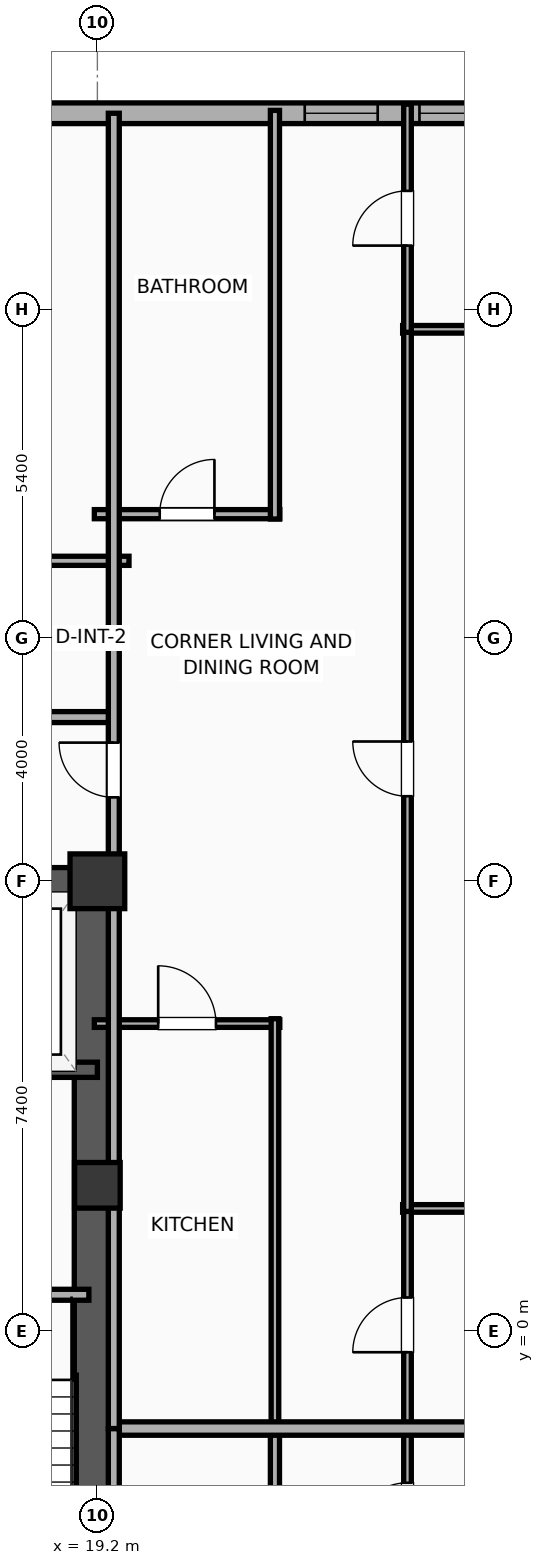
"""IFC4 building model, lengths in metres.
Left out: names, types, materials, properties, quantities, classifications, styles, units other than length and angle.
Written with IfcOpenShell. Run it as: python <this file> out.ifc"""

import sys

from ifc_helpers import new_model, si_unit, direction, frame, frame_2d, origin, origin_2d, place, context, subcontext, project, spatial, rectangle, extrude, element, fill, save


model = new_model("IFC4")
c1 = context("Model", 3, precision=1e-05, world=origin(), true_north=direction((0.0, 1.0)))
c2 = subcontext(c1, "Body", "Model", "MODEL_VIEW")
j1 = project(units=[si_unit("LENGTHUNIT", "METRE"), si_unit("PLANEANGLEUNIT", "RADIAN")], contexts=[c1])
p1 = place(None, origin())
s1 = spatial("IfcSite", under=j1, at=p1, CompositionType="ELEMENT")
p2 = place(p1, origin())
s2 = spatial("IfcBuilding", under=s1, at=p2, CompositionType="ELEMENT")
p3 = place(p2, frame((0.0, 0.0, 200.2)))
s3 = spatial("IfcBuildingStorey", under=s2, at=p3, CompositionType="ELEMENT", Elevation=200.2)
p4 = place(p3, frame((19.2, 2.4, 0.0), z_axis=(0.0, 0.0, 1.0), x_axis=(1.0, 0.0, 0.0)))
e1 = element("IfcColumn", 1, at=p4, inside=s3, PredefinedType="COLUMN", context=c2, shape_type="SweptSolid", body=[
    extrude(rectangle(XDim=0.75, YDim=0.75, at=origin_2d()), origin(), (0.0, 0.0, 1.0), 3.9),
])
p5 = place(p3, frame((19.2, 7.4, 0.0), z_axis=(0.0, 0.0, 1.0), x_axis=(1.0, 0.0, 0.0)))
e2 = element("IfcColumn", 2, at=p5, inside=s3, PredefinedType="COLUMN", context=c2, shape_type="SweptSolid", body=[
    extrude(rectangle(XDim=0.9, YDim=0.9, at=origin_2d()), origin(), (0.0, 0.0, 1.0), 3.9),
])
p6 = place(p3, frame((12.175, 7.4, 0.0), z_axis=(0.0, 0.0, 1.0), x_axis=(1.0, 0.0, 0.0)))
e3 = element("IfcWall", 3, at=p6, inside=s3, PredefinedType="SHEAR", context=c2, shape_type="SweptSolid", body=[
    extrude(rectangle(XDim=7.25, YDim=0.45, at=frame_2d((3.625, 0.0))), origin(), (0.0, 0.0, 1.0), 3.65),
])
p7 = place(p3, frame((19.145, -7.4, 0.0), z_axis=(0.0, 0.0, 1.0), x_axis=(0.0, 1.0, 0.0)))
e4 = element("IfcWall", 4, at=p7, inside=s3, PredefinedType="SHEAR", context=c2, shape_type="SweptSolid", body=[
    extrude(rectangle(XDim=14.8, YDim=0.65, at=frame_2d((7.4, 0.0))), origin(), (0.0, 0.0, 1.0), 3.65),
])
p8 = place(p3, frame((-22.783, 20.03, 0.0), z_axis=(0.0, 0.0, 1.0), x_axis=(1.0, 0.0, 0.0)))
e5 = element("IfcWall", 5, at=p8, inside=s3, PredefinedType="ELEMENTEDWALL", context=c2, shape_type="SweptSolid", body=[
    extrude(rectangle(XDim=49.566, YDim=0.34, at=frame_2d((24.783, 0.0))), origin(), (0.0, 0.0, 1.0), 2.54),
])
p9 = place(p8, frame((6.211, 0.0, 0.75)))
e6 = element("IfcOpeningElement", 6, at=p9, cuts=e5, PredefinedType="OPENING", context=c2, shape_type="SweptSolid", body=[
    extrude(rectangle(XDim=2.4, YDim=1.63, at=frame_2d((1.2, 0.815))), frame((0.0, 0.18, 0.0), z_axis=(0.0, -1.0, 0.0), x_axis=(1.0, 0.0, 0.0)), (0.0, 0.0, 1.0), 0.36),
])
p10 = place(p8, frame((23.583, 0.0, 0.75)))
e7 = element("IfcOpeningElement", 7, at=p10, cuts=e5, PredefinedType="OPENING", context=c2, shape_type="SweptSolid", body=[
    extrude(rectangle(XDim=2.4, YDim=1.63, at=frame_2d((1.2, 0.815))), frame((0.0, 0.18, 0.0), z_axis=(0.0, -1.0, 0.0), x_axis=(1.0, 0.0, 0.0)), (0.0, 0.0, 1.0), 0.36),
])
p11 = place(p8, frame((3.893, 0.0, 0.75)))
e8 = element("IfcOpeningElement", 8, at=p11, cuts=e5, PredefinedType="OPENING", context=c2, shape_type="SweptSolid", body=[
    extrude(rectangle(XDim=1.2, YDim=1.63, at=frame_2d((0.6, 0.815))), frame((0.0, 0.18, 0.0), z_axis=(0.0, -1.0, 0.0), x_axis=(1.0, 0.0, 0.0)), (0.0, 0.0, 1.0), 0.36),
])
p12 = place(p8, frame((11.273, 0.0, 0.75)))
e9 = element("IfcOpeningElement", 9, at=p12, cuts=e5, PredefinedType="OPENING", context=c2, shape_type="SweptSolid", body=[
    extrude(rectangle(XDim=1.2, YDim=1.63, at=frame_2d((0.6, 0.815))), frame((0.0, 0.18, 0.0), z_axis=(0.0, -1.0, 0.0), x_axis=(1.0, 0.0, 0.0)), (0.0, 0.0, 1.0), 0.36),
])
p13 = place(p8, frame((31.889, 0.0, 0.75)))
e10 = element("IfcOpeningElement", 10, at=p13, cuts=e5, PredefinedType="OPENING", context=c2, shape_type="SweptSolid", body=[
    extrude(rectangle(XDim=1.2, YDim=1.63, at=frame_2d((0.6, 0.815))), frame((0.0, 0.18, 0.0), z_axis=(0.0, -1.0, 0.0), x_axis=(1.0, 0.0, 0.0)), (0.0, 0.0, 1.0), 0.36),
])
p14 = place(p8, frame((34.719, 0.0, 0.75)))
e11 = element("IfcOpeningElement", 11, at=p14, cuts=e5, PredefinedType="OPENING", context=c2, shape_type="SweptSolid", body=[
    extrude(rectangle(XDim=1.2, YDim=1.63, at=frame_2d((0.6, 0.815))), frame((0.0, 0.18, 0.0), z_axis=(0.0, -1.0, 0.0), x_axis=(1.0, 0.0, 0.0)), (0.0, 0.0, 1.0), 0.36),
])
p15 = place(p8, frame((37.823, 0.0, 0.75)))
e12 = element("IfcOpeningElement", 12, at=p15, cuts=e5, PredefinedType="OPENING", context=c2, shape_type="SweptSolid", body=[
    extrude(rectangle(XDim=1.2, YDim=1.63, at=frame_2d((0.6, 0.815))), frame((0.0, 0.18, 0.0), z_axis=(0.0, -1.0, 0.0), x_axis=(1.0, 0.0, 0.0)), (0.0, 0.0, 1.0), 0.36),
])
p16 = place(p8, frame((16.113, 0.0, 0.75)))
e13 = element("IfcOpeningElement", 13, at=p16, cuts=e5, PredefinedType="OPENING", context=c2, shape_type="SweptSolid", body=[
    extrude(rectangle(XDim=1.2, YDim=1.63, at=frame_2d((0.6, 0.815))), frame((0.0, 0.18, 0.0), z_axis=(0.0, -1.0, 0.0), x_axis=(1.0, 0.0, 0.0)), (0.0, 0.0, 1.0), 0.36),
])
p17 = place(p8, frame((20.513, 0.0, 0.75)))
e14 = element("IfcOpeningElement", 14, at=p17, cuts=e5, PredefinedType="OPENING", context=c2, shape_type="SweptSolid", body=[
    extrude(rectangle(XDim=1.2, YDim=1.63, at=frame_2d((0.6, 0.815))), frame((0.0, 0.18, 0.0), z_axis=(0.0, -1.0, 0.0), x_axis=(1.0, 0.0, 0.0)), (0.0, 0.0, 1.0), 0.36),
])
p18 = place(p8, frame((27.893, 0.0, 0.75)))
e15 = element("IfcOpeningElement", 15, at=p18, cuts=e5, PredefinedType="OPENING", context=c2, shape_type="SweptSolid", body=[
    extrude(rectangle(XDim=1.2, YDim=1.63, at=frame_2d((0.6, 0.815))), frame((0.0, 0.18, 0.0), z_axis=(0.0, -1.0, 0.0), x_axis=(1.0, 0.0, 0.0)), (0.0, 0.0, 1.0), 0.36),
])
p19 = place(p8, frame((45.393, 0.0, 0.75)))
e16 = element("IfcOpeningElement", 16, at=p19, cuts=e5, PredefinedType="OPENING", context=c2, shape_type="SweptSolid", body=[
    extrude(rectangle(XDim=1.2, YDim=1.63, at=frame_2d((0.6, 0.815))), frame((0.0, 0.18, 0.0), z_axis=(0.0, -1.0, 0.0), x_axis=(1.0, 0.0, 0.0)), (0.0, 0.0, 1.0), 0.36),
])
p20 = place(p8, frame((47.28, 0.0, 0.75)))
e17 = element("IfcOpeningElement", 17, at=p20, cuts=e5, PredefinedType="OPENING", context=c2, shape_type="SweptSolid", body=[
    extrude(rectangle(XDim=1.2, YDim=1.63, at=frame_2d((0.6, 0.815))), frame((0.0, 0.18, 0.0), z_axis=(0.0, -1.0, 0.0), x_axis=(1.0, 0.0, 0.0)), (0.0, 0.0, 1.0), 0.36),
])
p21 = place(p3, frame((16.6, 4.3, 0.0), z_axis=(0.0, 0.0, 1.0), x_axis=(1.0, 0.0, 0.0)))
e18 = element("IfcWall", 18, at=p21, inside=s3, PredefinedType="SOLIDWALL", context=c2, shape_type="SweptSolid", body=[
    extrude(rectangle(XDim=2.6, YDim=0.25, at=frame_2d((1.3, 0.0))), origin(), (0.0, 0.0, 1.0), 3.65),
])
p22 = place(p3, frame((15.7, 0.6, 0.0), z_axis=(0.0, 0.0, 1.0), x_axis=(1.0, 0.0, 0.0)))
e19 = element("IfcWall", 19, at=p22, inside=s3, PredefinedType="PARTITIONING", context=c2, shape_type="SweptSolid", body=[
    extrude(rectangle(XDim=3.36, YDim=0.18, at=frame_2d((1.68, 0.0))), origin(), (0.0, 0.0, 1.0), 3.65),
])
p23 = place(p22, frame((1.155, 0.0, 0.0)))
e20 = element("IfcOpeningElement", 20, at=p23, cuts=e19, PredefinedType="OPENING", context=c2, shape_type="SweptSolid", body=[
    extrude(rectangle(XDim=1.05, YDim=2.05, at=frame_2d((0.525, 1.025))), frame((0.0, 0.1, 0.0), z_axis=(0.0, -1.0, 0.0), x_axis=(1.0, 0.0, 0.0)), (0.0, 0.0, 1.0), 0.2),
])
p24 = place(p3, frame((17.436, 12.67, 0.0), z_axis=(0.0, 0.0, 1.0), x_axis=(1.0, 0.0, 0.0)))
e21 = element("IfcWall", 21, at=p24, inside=s3, PredefinedType="PLUMBINGWALL", context=c2, shape_type="SweptSolid", body=[
    extrude(rectangle(XDim=2.284, YDim=0.15, at=frame_2d((1.142, 0.0))), origin(), (0.0, 0.0, 1.0), 3.65),
])
p25 = place(p3, frame((8.08, 10.1, 0.0), z_axis=(0.0, 0.0, 1.0), x_axis=(1.0, 0.0, 0.0)))
e22 = element("IfcWall", 22, at=p25, inside=s3, PredefinedType="PARTITIONING", context=c2, shape_type="SweptSolid", body=[
    extrude(rectangle(XDim=11.42, YDim=0.18, at=frame_2d((5.71, 0.0))), origin(), (0.0, 0.0, 1.0), 3.65),
])
p26 = place(p25, frame((1.081, 0.0, 0.0)))
e23 = element("IfcOpeningElement", 23, at=p26, cuts=e22, PredefinedType="OPENING", context=c2, shape_type="SweptSolid", body=[
    extrude(rectangle(XDim=1.15, YDim=2.05, at=frame_2d((0.575, 1.025))), frame((0.0, 0.1, 0.0), z_axis=(0.0, -1.0, 0.0), x_axis=(1.0, 0.0, 0.0)), (0.0, 0.0, 1.0), 0.2),
])
p27 = place(p25, frame((8.243, 0.0, 0.0)))
e24 = element("IfcOpeningElement", 24, at=p27, cuts=e22, PredefinedType="OPENING", context=c2, shape_type="SweptSolid", body=[
    extrude(rectangle(XDim=0.9, YDim=2.05, at=frame_2d((0.45, 1.025))), frame((0.0, 0.1, 0.0), z_axis=(0.0, -1.0, 0.0), x_axis=(1.0, 0.0, 0.0)), (0.0, 0.0, 1.0), 0.2),
])
p28 = place(p3, frame((24.3, -4.544, 0.0), z_axis=(0.0, 0.0, 1.0), x_axis=(0.0, 1.0, 0.0)))
e25 = element("IfcWall", 25, at=p28, inside=s3, PredefinedType="PARTITIONING", context=c2, shape_type="SweptSolid", body=[
    extrude(rectangle(XDim=3.006, YDim=0.125, at=frame_2d((1.503, 0.0))), origin(), (0.0, 0.0, 1.0), 3.65),
])
p29 = place(p28, frame((1.152, 0.0, 0.0)))
e26 = element("IfcOpeningElement", 26, at=p29, cuts=e25, PredefinedType="OPENING", context=c2, shape_type="SweptSolid", body=[
    extrude(rectangle(XDim=0.9, YDim=2.05, at=frame_2d((0.45, 1.025))), frame((0.0, 0.073, 0.0), z_axis=(0.0, -1.0, 0.0), x_axis=(1.0, 0.0, 0.0)), (0.0, 0.0, 1.0), 0.145),
])
p30 = place(p3, frame((22.12, -8.267, 0.0), z_axis=(0.0, 0.0, 1.0), x_axis=(0.0, 1.0, 0.0)))
e27 = element("IfcWall", 27, at=p30, inside=s3, PredefinedType="PLUMBINGWALL", context=c2, shape_type="SweptSolid", body=[
    extrude(rectangle(XDim=6.647, YDim=0.15, at=frame_2d((3.323, 0.0))), origin(), (0.0, 0.0, 1.0), 3.65),
])
for number, where, z_axis, x_axis in (
    (28, (24.22, 2.02, 0.0), (0.0, 0.0, 1.0), (1.0, 0.0, 0.0)),
    (29, (24.22, 16.477, 0.0), (0.0, 0.0, 1.0), (1.0, 0.0, 0.0)),
):
    element("IfcWall", number, at=place(p3, frame(where, z_axis=z_axis, x_axis=x_axis)), inside=s3, PredefinedType="PARTITIONING", context=c2, shape_type="SweptSolid", body=[
        extrude(rectangle(XDim=6.16, YDim=0.125, at=frame_2d((3.08, 0.0))), origin(), (0.0, 0.0, 1.0), 3.65),
    ])
p31 = place(p3, frame((24.3, -1.663, 0.0), z_axis=(0.0, 0.0, 1.0), x_axis=(0.0, 1.0, 0.0)))
e30 = element("IfcWall", 30, at=p31, inside=s3, PredefinedType="PARTITIONING", context=c2, shape_type="SweptSolid", body=[
    extrude(rectangle(XDim=3.733, YDim=0.125, at=frame_2d((1.866, 0.0))), origin(), (0.0, 0.0, 1.0), 3.65),
])
p32 = place(p31, frame((1.317, 0.0, 0.0)))
e31 = element("IfcOpeningElement", 31, at=p32, cuts=e30, PredefinedType="OPENING", context=c2, shape_type="SweptSolid", body=[
    extrude(rectangle(XDim=0.9, YDim=2.05, at=frame_2d((0.45, 1.025))), frame((0.0, 0.073, 0.0), z_axis=(0.0, -1.0, 0.0), x_axis=(1.0, 0.0, 0.0)), (0.0, 0.0, 1.0), 0.145),
])
p33 = place(p3, frame((24.3, 1.97, 0.0), z_axis=(0.0, 0.0, 1.0), x_axis=(0.0, 1.0, 0.0)))
e32 = element("IfcWall", 32, at=p33, inside=s3, PredefinedType="PARTITIONING", context=c2, shape_type="SweptSolid", body=[
    extrude(rectangle(XDim=14.557, YDim=0.125, at=frame_2d((7.279, 0.0))), origin(), (0.0, 0.0, 1.0), 3.65),
])
p34 = place(p33, frame((6.829, 0.0, 0.0)))
e33 = element("IfcOpeningElement", 33, at=p34, cuts=e32, PredefinedType="OPENING", context=c2, shape_type="SweptSolid", body=[
    extrude(rectangle(XDim=0.9, YDim=2.05, at=frame_2d((0.45, 1.025))), frame((0.0, 0.073, 0.0), z_axis=(0.0, -1.0, 0.0), x_axis=(1.0, 0.0, 0.0)), (0.0, 0.0, 1.0), 0.145),
])
p35 = place(p3, frame((24.3, 16.427, 0.0), z_axis=(0.0, 0.0, 1.0), x_axis=(0.0, 1.0, 0.0)))
e34 = element("IfcWall", 34, at=p35, inside=s3, PredefinedType="PARTITIONING", context=c2, shape_type="SweptSolid", body=[
    extrude(rectangle(XDim=3.753, YDim=0.125, at=frame_2d((1.876, 0.0))), origin(), (0.0, 0.0, 1.0), 3.65),
])
p36 = place(p35, frame((1.427, 0.0, 0.0)))
e35 = element("IfcOpeningElement", 35, at=p36, cuts=e34, PredefinedType="OPENING", context=c2, shape_type="SweptSolid", body=[
    extrude(rectangle(XDim=0.9, YDim=2.05, at=frame_2d((0.45, 1.025))), frame((0.0, 0.073, 0.0), z_axis=(0.0, -1.0, 0.0), x_axis=(1.0, 0.0, 0.0)), (0.0, 0.0, 1.0), 0.145),
])
p37 = place(p3, frame((19.15, 5.06, 0.0), z_axis=(0.0, 0.0, 1.0), x_axis=(1.0, 0.0, 0.0)))
e36 = element("IfcWall", 36, at=p37, inside=s3, PredefinedType="PARTITIONING", context=c2, shape_type="SweptSolid", body=[
    extrude(rectangle(XDim=3.05, YDim=0.125, at=frame_2d((1.525, 0.0))), origin(), (0.0, 0.0, 1.0), 3.65),
])
p38 = place(p37, frame((1.05, 0.0, 0.0)))
e37 = element("IfcOpeningElement", 37, at=p38, cuts=e36, PredefinedType="OPENING", context=c2, shape_type="SweptSolid", body=[
    extrude(rectangle(XDim=0.95, YDim=2.05, at=frame_2d((0.475, 1.025))), frame((0.0, 0.073, 0.0), z_axis=(0.0, -1.0, 0.0), x_axis=(1.0, 0.0, 0.0)), (0.0, 0.0, 1.0), 0.145),
])
p39 = place(p3, frame((19.15, 13.437, 0.0), z_axis=(0.0, 0.0, 1.0), x_axis=(1.0, 0.0, 0.0)))
e38 = element("IfcWall", 38, at=p39, inside=s3, PredefinedType="PLUMBINGWALL", context=c2, shape_type="SweptSolid", body=[
    extrude(rectangle(XDim=3.05, YDim=0.15, at=frame_2d((1.525, 0.0))), origin(), (0.0, 0.0, 1.0), 3.65),
])
p40 = place(p39, frame((1.075, 0.0, 0.0)))
e39 = element("IfcOpeningElement", 39, at=p40, cuts=e38, PredefinedType="OPENING", context=c2, shape_type="SweptSolid", body=[
    extrude(rectangle(XDim=0.9, YDim=2.05, at=frame_2d((0.45, 1.025))), frame((0.0, 0.085, 0.0), z_axis=(0.0, -1.0, 0.0), x_axis=(1.0, 0.0, 0.0)), (0.0, 0.0, 1.0), 0.17),
])
p41 = place(p3, frame((22.12, -1.58, 0.0), z_axis=(0.0, 0.0, 1.0), x_axis=(0.0, 1.0, 0.0)))
e40 = element("IfcWall", 40, at=p41, inside=s3, PredefinedType="PARTITIONING", context=c2, shape_type="SweptSolid", body=[
    extrude(rectangle(XDim=6.72, YDim=0.125, at=frame_2d((3.36, 0.0))), origin(), (0.0, 0.0, 1.0), 3.65),
])
p42 = place(p3, frame((22.12, 13.357, 0.0), z_axis=(0.0, 0.0, 1.0), x_axis=(0.0, 1.0, 0.0)))
e41 = element("IfcWall", 41, at=p42, inside=s3, PredefinedType="PLUMBINGWALL", context=c2, shape_type="SweptSolid", body=[
    extrude(rectangle(XDim=6.72, YDim=0.15, at=frame_2d((3.36, 0.0))), origin(), (0.0, 0.0, 1.0), 3.65),
])
p43 = place(p3, frame((19.47, -1.6, 0.0), z_axis=(0.0, 0.0, 1.0), x_axis=(1.0, 0.0, 0.0)))
e42 = element("IfcWall", 42, at=p43, inside=s3, PredefinedType="PARTITIONING", context=c2, shape_type="SweptSolid", body=[
    extrude(rectangle(XDim=10.76, YDim=0.22, at=frame_2d((5.38, 0.0))), origin(), (0.0, 0.0, 1.0), 3.65),
])
p44 = place(p3, frame((19.47, -18.83, 0.0), z_axis=(0.0, 0.0, 1.0), x_axis=(0.0, 1.0, 0.0)))
e43 = element("IfcWall", 43, at=p44, inside=s3, PredefinedType="PARTITIONING", context=c2, shape_type="SweptSolid", body=[
    extrude(rectangle(XDim=17.23, YDim=0.18, at=frame_2d((8.615, 0.0))), origin(), (0.0, 0.0, 1.0), 3.65),
])
p45 = place(p44, frame((9.151, 0.0, 0.0)))
e44 = element("IfcOpeningElement", 44, at=p45, cuts=e43, PredefinedType="OPENING", context=c2, shape_type="SweptSolid", body=[
    extrude(rectangle(XDim=0.9, YDim=2.05, at=frame_2d((0.45, 1.025))), frame((0.0, 0.1, 0.0), z_axis=(0.0, -1.0, 0.0), x_axis=(1.0, 0.0, 0.0)), (0.0, 0.0, 1.0), 0.2),
])
p46 = place(p3, frame((19.47, -1.6, 0.0), z_axis=(0.0, 0.0, 1.0), x_axis=(0.0, 1.0, 0.0)))
e45 = element("IfcWall", 45, at=p46, inside=s3, PredefinedType="PARTITIONING", context=c2, shape_type="SweptSolid", body=[
    extrude(rectangle(XDim=21.63, YDim=0.18, at=frame_2d((10.815, 0.0))), origin(), (0.0, 0.0, 1.0), 3.65),
])
p47 = place(p46, frame((10.38, 0.0, 0.0)))
e46 = element("IfcOpeningElement", 46, at=p47, cuts=e45, PredefinedType="OPENING", context=c2, shape_type="SweptSolid", body=[
    extrude(rectangle(XDim=0.9, YDim=2.05, at=frame_2d((0.45, 1.025))), frame((0.0, 0.1, 0.0), z_axis=(0.0, -1.0, 0.0), x_axis=(1.0, 0.0, 0.0)), (0.0, 0.0, 1.0), 0.2),
])
p48 = place(p19, origin())
e47 = element("IfcWindow", 47, at=p48, inside=s3, PartitioningType="SINGLE_PANEL", PredefinedType="WINDOW", context=c2, shape_type="SweptSolid", body=[
    extrude(rectangle(XDim=1.2, YDim=1.63, at=frame_2d((0.6, 0.815))), frame((0.0, 0.03, 0.0), z_axis=(0.0, -1.0, 0.0), x_axis=(1.0, 0.0, 0.0)), (0.0, 0.0, 1.0), 0.06),
])
fill(e16, e47)
p49 = place(p20, origin())
e48 = element("IfcWindow", 48, at=p49, inside=s3, PartitioningType="SINGLE_PANEL", PredefinedType="WINDOW", context=c2, shape_type="SweptSolid", body=[
    extrude(rectangle(XDim=1.2, YDim=1.63, at=frame_2d((0.6, 0.815))), frame((0.0, 0.03, 0.0), z_axis=(0.0, -1.0, 0.0), x_axis=(1.0, 0.0, 0.0)), (0.0, 0.0, 1.0), 0.06),
])
fill(e17, e48)
p50 = place(p29, origin())
e49 = element("IfcDoor", 49, at=p50, inside=s3, OperationType="SINGLE_SWING_LEFT", PredefinedType="DOOR", context=c2, shape_type="SweptSolid", body=[
    extrude(rectangle(XDim=0.9, YDim=2.05, at=frame_2d((0.45, 1.025))), frame((0.0, 0.025, 0.0), z_axis=(0.0, -1.0, 0.0), x_axis=(1.0, 0.0, 0.0)), (0.0, 0.0, 1.0), 0.05),
])
fill(e26, e49)
p51 = place(p32, origin())
e50 = element("IfcDoor", 50, at=p51, inside=s3, OperationType="SINGLE_SWING_LEFT", PredefinedType="DOOR", context=c2, shape_type="SweptSolid", body=[
    extrude(rectangle(XDim=0.9, YDim=2.05, at=frame_2d((0.45, 1.025))), frame((0.0, 0.025, 0.0), z_axis=(0.0, -1.0, 0.0), x_axis=(1.0, 0.0, 0.0)), (0.0, 0.0, 1.0), 0.05),
])
fill(e31, e50)
p52 = place(p34, origin())
e51 = element("IfcDoor", 51, at=p52, inside=s3, OperationType="SINGLE_SWING_RIGHT", PredefinedType="DOOR", context=c2, shape_type="SweptSolid", body=[
    extrude(rectangle(XDim=0.9, YDim=2.05, at=frame_2d((0.45, 1.025))), frame((0.0, 0.025, 0.0), z_axis=(0.0, -1.0, 0.0), x_axis=(1.0, 0.0, 0.0)), (0.0, 0.0, 1.0), 0.05),
])
fill(e33, e51)
p53 = place(p36, origin())
e52 = element("IfcDoor", 52, at=p53, inside=s3, OperationType="SINGLE_SWING_LEFT", PredefinedType="DOOR", context=c2, shape_type="SweptSolid", body=[
    extrude(rectangle(XDim=0.9, YDim=2.05, at=frame_2d((0.45, 1.025))), frame((0.0, 0.025, 0.0), z_axis=(0.0, -1.0, 0.0), x_axis=(1.0, 0.0, 0.0)), (0.0, 0.0, 1.0), 0.05),
])
fill(e35, e52)
p54 = place(p38, origin())
e53 = element("IfcDoor", 53, at=p54, inside=s3, OperationType="SINGLE_SWING_LEFT", PredefinedType="DOOR", context=c2, shape_type="SweptSolid", body=[
    extrude(rectangle(XDim=0.95, YDim=2.05, at=frame_2d((0.475, 1.025))), frame((0.0, 0.025, 0.0), z_axis=(0.0, -1.0, 0.0), x_axis=(1.0, 0.0, 0.0)), (0.0, 0.0, 1.0), 0.05),
])
fill(e37, e53)
p55 = place(p40, origin())
e54 = element("IfcDoor", 54, at=p55, inside=s3, OperationType="SINGLE_SWING_RIGHT", PredefinedType="DOOR", context=c2, shape_type="SweptSolid", body=[
    extrude(rectangle(XDim=0.9, YDim=2.05, at=frame_2d((0.45, 1.025))), frame((0.0, 0.025, 0.0), z_axis=(0.0, -1.0, 0.0), x_axis=(1.0, 0.0, 0.0)), (0.0, 0.0, 1.0), 0.05),
])
fill(e39, e54)
p56 = place(p47, origin())
e55 = element("IfcDoor", 55, at=p56, inside=s3, OperationType="SINGLE_SWING_RIGHT", PredefinedType="DOOR", context=c2, shape_type="SweptSolid", body=[
    extrude(rectangle(XDim=0.9, YDim=2.05, at=frame_2d((0.45, 1.025))), frame((0.0, 0.025, 0.0), z_axis=(0.0, -1.0, 0.0), x_axis=(1.0, 0.0, 0.0)), (0.0, 0.0, 1.0), 0.05),
])
fill(e46, e55)
save(model, sys.argv[1])
